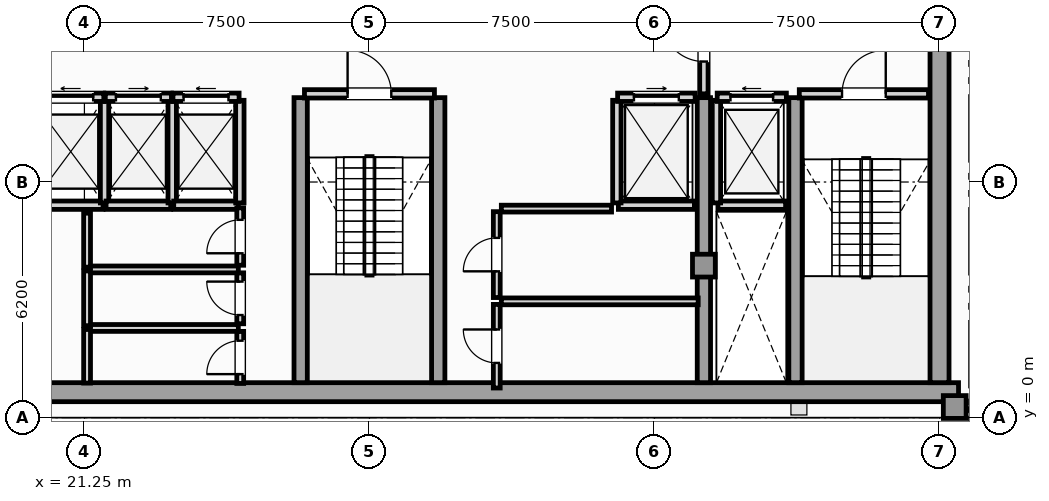
"""IFC4 building model, lengths in metres.
Left out: names, types, materials, properties, quantities, classifications, styles, units other than length and angle.
Written with IfcOpenShell. Run it as: python <this file> out.ifc"""

import sys

from ifc_helpers import new_model, si_unit, direction, frame, frame_2d, origin, origin_2d, place, context, subcontext, project, spatial, rectangle, extrude, element, fill, save


model = new_model("IFC4")
c1 = context("Model", 3, precision=1e-05, world=origin(), true_north=direction((0.0, 1.0)))
c2 = subcontext(c1, "Body", "Model", "MODEL_VIEW")
j1 = project(units=[si_unit("LENGTHUNIT", "METRE"), si_unit("PLANEANGLEUNIT", "RADIAN")], contexts=[c1])
p1 = place(None, origin())
s1 = spatial("IfcSite", under=j1, at=p1, CompositionType="ELEMENT")
p2 = place(p1, origin())
s2 = spatial("IfcBuilding", under=s1, at=p2, CompositionType="ELEMENT")
p3 = place(p2, frame((0.0, 0.0, 353.45)))
s3 = spatial("IfcBuildingStorey", under=s2, at=p3, CompositionType="ELEMENT", Elevation=353.45)
p4 = place(p3, frame((13.25, 0.67, 0.0), z_axis=(0.0, 0.0, 1.0), x_axis=(1.0, 0.0, 0.0)))
e1 = element("IfcWall", 1, at=p4, inside=s3, PredefinedType="SHEAR", context=c2, shape_type="SweptSolid", body=[
    extrude(rectangle(XDim=31.0, YDim=0.5, at=frame_2d((15.5, 0.0))), origin(), (0.0, 0.0, 1.0), 4.14),
])
p5 = place(p3, frame((43.75, 0.92, 0.0), z_axis=(0.0, 0.0, 1.0), x_axis=(0.0, 1.0, 0.0)))
e2 = element("IfcWall", 2, at=p5, inside=s3, PredefinedType="SHEAR", context=c2, shape_type="SweptSolid", body=[
    extrude(rectangle(XDim=10.53, YDim=0.5, at=frame_2d((5.265, 0.0))), origin(), (0.0, 0.0, 1.0), 4.14),
])
for number, where, z_axis, x_axis in (
    (3, (26.94, 0.92, 0.0), (0.0, 0.0, 1.0), (0.0, 1.0, 0.0)),
    (4, (30.56, 0.92, 0.0), (0.0, 0.0, 1.0), (0.0, 1.0, 0.0)),
    (5, (37.55, 0.92, 0.0), (0.0, 0.0, 1.0), (0.0, 1.0, 0.0)),
    (6, (39.96, 0.92, 0.0), (0.0, 0.0, 1.0), (0.0, 1.0, 0.0)),
):
    element("IfcWall", number, at=place(p3, frame(where, z_axis=z_axis, x_axis=x_axis)), inside=s3, PredefinedType="SHEAR", context=c2, shape_type="SweptSolid", body=[
        extrude(rectangle(XDim=7.5, YDim=0.35, at=frame_2d((3.75, 0.0))), origin(), (0.0, 0.0, 1.0), 4.14),
    ])
for number, where, z_axis, x_axis in (
    (7, (44.15, 0.28, 0.0), (0.0, 0.0, 1.0), (1.0, 0.0, 0.0)),
    (8, (37.55, 4.0, 0.0), (0.0, 0.0, 1.0), (1.0, 0.0, 0.0)),
):
    element("IfcColumn", number, at=place(p3, frame(where, z_axis=z_axis, x_axis=x_axis)), inside=s3, PredefinedType="COLUMN", context=c2, shape_type="SweptSolid", body=[
        extrude(rectangle(XDim=0.6, YDim=0.6, at=origin_2d()), origin(), (0.0, 0.0, 1.0), 4.4),
    ])
p6 = place(p3, frame((44.604, 0.12, 0.0), z_axis=(0.0, 0.0, 1.0), x_axis=(0.707106781187, 0.707106781187, 0.0)))
e9 = element("IfcWall", 9, at=p6, inside=s3, PredefinedType="SOLIDWALL", context=c2, shape_type="SweptSolid", body=[
    extrude(rectangle(XDim=4.446, YDim=0.26, at=frame_2d((2.223, 0.0))), origin(), (0.0, 0.0, 1.0), 4.14),
])
p7 = place(p6, frame((0.78, 0.0, 0.95)))
e10 = element("IfcOpeningElement", 10, at=p7, cuts=e9, PredefinedType="OPENING", context=c2, shape_type="SweptSolid", body=[
    extrude(rectangle(XDim=0.9, YDim=1.5, at=frame_2d((0.45, 0.75))), frame((0.0, 0.14, 0.0), z_axis=(0.0, -1.0, 0.0), x_axis=(1.0, 0.0, 0.0)), (0.0, 0.0, 1.0), 0.28),
])
p8 = place(p3, frame((37.92, 5.59, 0.0), z_axis=(0.0, 0.0, 1.0), x_axis=(1.0, 0.0, 0.0)))
e11 = element("IfcWall", 11, at=p8, inside=s3, PredefinedType="SOLIDWALL", context=c2, shape_type="SweptSolid", body=[
    extrude(rectangle(XDim=1.78, YDim=0.22, at=frame_2d((0.89, 0.0))), origin(), (0.0, 0.0, 1.0), 4.14),
])
p9 = place(p3, frame((37.88, 5.65, 0.0), z_axis=(0.0, 0.0, 1.0), x_axis=(0.0, 1.0, 0.0)))
e12 = element("IfcWall", 12, at=p9, inside=s3, PredefinedType="SOLIDWALL", context=c2, shape_type="SweptSolid", body=[
    extrude(rectangle(XDim=2.7, YDim=0.22, at=frame_2d((1.35, 0.0))), origin(), (0.0, 0.0, 1.0), 4.14),
])
p10 = place(p3, frame((37.9, 8.43, 0.0), z_axis=(0.0, 0.0, 1.0), x_axis=(1.0, 0.0, 0.0)))
e13 = element("IfcWall", 13, at=p10, inside=s3, PredefinedType="SOLIDWALL", context=c2, shape_type="SweptSolid", body=[
    extrude(rectangle(XDim=1.82, YDim=0.22, at=frame_2d((0.91, 0.0))), origin(), (0.0, 0.0, 1.0), 4.14),
])
p11 = place(p10, frame((0.35, 0.0, 0.0)))
e14 = element("IfcOpeningElement", 14, at=p11, cuts=e13, PredefinedType="OPENING", context=c2, shape_type="SweptSolid", body=[
    extrude(rectangle(XDim=1.12, YDim=2.25, at=frame_2d((0.56, 1.125))), frame((0.0, 0.12, 0.0), z_axis=(0.0, -1.0, 0.0), x_axis=(1.0, 0.0, 0.0)), (0.0, 0.0, 1.0), 0.24),
])
p12 = place(p3, frame((35.3, 5.59, 0.0), z_axis=(0.0, 0.0, 1.0), x_axis=(1.0, 0.0, 0.0)))
e15 = element("IfcWall", 15, at=p12, inside=s3, PredefinedType="SOLIDWALL", context=c2, shape_type="SweptSolid", body=[
    extrude(rectangle(XDim=2.0, YDim=0.22, at=frame_2d((1.0, 0.0))), origin(), (0.0, 0.0, 1.0), 4.14),
])
p13 = place(p3, frame((35.26, 5.65, 0.0), z_axis=(0.0, 0.0, 1.0), x_axis=(0.0, 1.0, 0.0)))
e16 = element("IfcWall", 16, at=p13, inside=s3, PredefinedType="SOLIDWALL", context=c2, shape_type="SweptSolid", body=[
    extrude(rectangle(XDim=2.7, YDim=0.22, at=frame_2d((1.35, 0.0))), origin(), (0.0, 0.0, 1.0), 4.14),
])
p14 = place(p3, frame((35.28, 8.43, 0.0), z_axis=(0.0, 0.0, 1.0), x_axis=(1.0, 0.0, 0.0)))
e17 = element("IfcWall", 17, at=p14, inside=s3, PredefinedType="SOLIDWALL", context=c2, shape_type="SweptSolid", body=[
    extrude(rectangle(XDim=2.04, YDim=0.22, at=frame_2d((1.02, 0.0))), origin(), (0.0, 0.0, 1.0), 4.14),
])
p15 = place(p14, frame((0.43, 0.0, 0.0)))
e18 = element("IfcOpeningElement", 18, at=p15, cuts=e17, PredefinedType="OPENING", context=c2, shape_type="SweptSolid", body=[
    extrude(rectangle(XDim=1.18, YDim=2.2, at=frame_2d((0.59, 1.1))), frame((0.0, 0.12, 0.0), z_axis=(0.0, -1.0, 0.0), x_axis=(1.0, 0.0, 0.0)), (0.0, 0.0, 1.0), 0.24),
])
p16 = place(p3, frame((20.04, 5.59, 0.0), z_axis=(0.0, 0.0, 1.0), x_axis=(1.0, 0.0, 0.0)))
e19 = element("IfcWall", 19, at=p16, inside=s3, PredefinedType="SOLIDWALL", context=c2, shape_type="SweptSolid", body=[
    extrude(rectangle(XDim=1.7, YDim=0.22, at=frame_2d((0.85, 0.0))), origin(), (0.0, 0.0, 1.0), 4.14),
])
p17 = place(p3, frame((21.78, 5.65, 0.0), z_axis=(0.0, 0.0, 1.0), x_axis=(0.0, 1.0, 0.0)))
e20 = element("IfcWall", 20, at=p17, inside=s3, PredefinedType="SOLIDWALL", context=c2, shape_type="SweptSolid", body=[
    extrude(rectangle(XDim=2.7, YDim=0.22, at=frame_2d((1.35, 0.0))), origin(), (0.0, 0.0, 1.0), 4.14),
])
p18 = place(p3, frame((20.02, 8.43, 0.0), z_axis=(0.0, 0.0, 1.0), x_axis=(1.0, 0.0, 0.0)))
e21 = element("IfcWall", 21, at=p18, inside=s3, PredefinedType="SOLIDWALL", context=c2, shape_type="SweptSolid", body=[
    extrude(rectangle(XDim=1.74, YDim=0.22, at=frame_2d((0.87, 0.0))), origin(), (0.0, 0.0, 1.0), 4.14),
])
p19 = place(p18, frame((0.28, 0.0, 0.0)))
e22 = element("IfcOpeningElement", 22, at=p19, cuts=e21, PredefinedType="OPENING", context=c2, shape_type="SweptSolid", body=[
    extrude(rectangle(XDim=1.18, YDim=2.2, at=frame_2d((0.59, 1.1))), frame((0.0, 0.12, 0.0), z_axis=(0.0, -1.0, 0.0), x_axis=(1.0, 0.0, 0.0)), (0.0, 0.0, 1.0), 0.24),
])
p20 = place(p3, frame((21.82, 5.59, 0.0), z_axis=(0.0, 0.0, 1.0), x_axis=(1.0, 0.0, 0.0)))
e23 = element("IfcWall", 23, at=p20, inside=s3, PredefinedType="SOLIDWALL", context=c2, shape_type="SweptSolid", body=[
    extrude(rectangle(XDim=1.7, YDim=0.22, at=frame_2d((0.85, 0.0))), origin(), (0.0, 0.0, 1.0), 4.14),
])
p21 = place(p3, frame((23.56, 5.65, 0.0), z_axis=(0.0, 0.0, 1.0), x_axis=(0.0, 1.0, 0.0)))
e24 = element("IfcWall", 24, at=p21, inside=s3, PredefinedType="SOLIDWALL", context=c2, shape_type="SweptSolid", body=[
    extrude(rectangle(XDim=2.7, YDim=0.22, at=frame_2d((1.35, 0.0))), origin(), (0.0, 0.0, 1.0), 4.14),
])
p22 = place(p3, frame((21.8, 8.43, 0.0), z_axis=(0.0, 0.0, 1.0), x_axis=(1.0, 0.0, 0.0)))
e25 = element("IfcWall", 25, at=p22, inside=s3, PredefinedType="SOLIDWALL", context=c2, shape_type="SweptSolid", body=[
    extrude(rectangle(XDim=1.74, YDim=0.22, at=frame_2d((0.87, 0.0))), origin(), (0.0, 0.0, 1.0), 4.14),
])
p23 = place(p22, frame((0.28, 0.0, 0.0)))
e26 = element("IfcOpeningElement", 26, at=p23, cuts=e25, PredefinedType="OPENING", context=c2, shape_type="SweptSolid", body=[
    extrude(rectangle(XDim=1.18, YDim=2.2, at=frame_2d((0.59, 1.1))), frame((0.0, 0.12, 0.0), z_axis=(0.0, -1.0, 0.0), x_axis=(1.0, 0.0, 0.0)), (0.0, 0.0, 1.0), 0.24),
])
p24 = place(p3, frame((23.6, 5.59, 0.0), z_axis=(0.0, 0.0, 1.0), x_axis=(1.0, 0.0, 0.0)))
e27 = element("IfcWall", 27, at=p24, inside=s3, PredefinedType="SOLIDWALL", context=c2, shape_type="SweptSolid", body=[
    extrude(rectangle(XDim=1.7, YDim=0.22, at=frame_2d((0.85, 0.0))), origin(), (0.0, 0.0, 1.0), 4.14),
])
p25 = place(p3, frame((25.34, 5.65, 0.0), z_axis=(0.0, 0.0, 1.0), x_axis=(0.0, 1.0, 0.0)))
e28 = element("IfcWall", 28, at=p25, inside=s3, PredefinedType="SOLIDWALL", context=c2, shape_type="SweptSolid", body=[
    extrude(rectangle(XDim=2.7, YDim=0.22, at=frame_2d((1.35, 0.0))), origin(), (0.0, 0.0, 1.0), 4.14),
])
p26 = place(p3, frame((23.58, 8.43, 0.0), z_axis=(0.0, 0.0, 1.0), x_axis=(1.0, 0.0, 0.0)))
e29 = element("IfcWall", 29, at=p26, inside=s3, PredefinedType="SOLIDWALL", context=c2, shape_type="SweptSolid", body=[
    extrude(rectangle(XDim=1.74, YDim=0.22, at=frame_2d((0.87, 0.0))), origin(), (0.0, 0.0, 1.0), 4.14),
])
p27 = place(p26, frame((0.28, 0.0, 0.0)))
e30 = element("IfcOpeningElement", 30, at=p27, cuts=e29, PredefinedType="OPENING", context=c2, shape_type="SweptSolid", body=[
    extrude(rectangle(XDim=1.18, YDim=2.2, at=frame_2d((0.59, 1.1))), frame((0.0, 0.12, 0.0), z_axis=(0.0, -1.0, 0.0), x_axis=(1.0, 0.0, 0.0)), (0.0, 0.0, 1.0), 0.24),
])
p28 = place(p3, frame((40.06, 8.52, 0.0), z_axis=(0.0, 0.0, 1.0), x_axis=(1.0, 0.0, 0.0)))
e31 = element("IfcWall", 31, at=p28, inside=s3, PredefinedType="SOLIDWALL", context=c2, shape_type="SweptSolid", body=[
    extrude(rectangle(XDim=3.4, YDim=0.22, at=frame_2d((1.7, 0.0))), origin(), (0.0, 0.0, 1.0), 4.14),
])
p29 = place(p28, frame((1.125, 0.0, 0.0)))
e32 = element("IfcOpeningElement", 32, at=p29, cuts=e31, PredefinedType="OPENING", context=c2, shape_type="SweptSolid", body=[
    extrude(rectangle(XDim=1.15, YDim=2.2, at=frame_2d((0.575, 1.1))), frame((0.0, 0.12, 0.0), z_axis=(0.0, -1.0, 0.0), x_axis=(1.0, 0.0, 0.0)), (0.0, 0.0, 1.0), 0.24),
])
p30 = place(p3, frame((27.04, 8.52, 0.0), z_axis=(0.0, 0.0, 1.0), x_axis=(1.0, 0.0, 0.0)))
e33 = element("IfcWall", 33, at=p30, inside=s3, PredefinedType="SOLIDWALL", context=c2, shape_type="SweptSolid", body=[
    extrude(rectangle(XDim=3.42, YDim=0.22, at=frame_2d((1.71, 0.0))), origin(), (0.0, 0.0, 1.0), 4.14),
])
p31 = place(p30, frame((1.135, 0.0, 0.0)))
e34 = element("IfcOpeningElement", 34, at=p31, cuts=e33, PredefinedType="OPENING", context=c2, shape_type="SweptSolid", body=[
    extrude(rectangle(XDim=1.15, YDim=2.2, at=frame_2d((0.575, 1.1))), frame((0.0, 0.12, 0.0), z_axis=(0.0, -1.0, 0.0), x_axis=(1.0, 0.0, 0.0)), (0.0, 0.0, 1.0), 0.24),
])
p32 = place(p3, frame((37.55, 8.52, 0.0), z_axis=(0.0, 0.0, 1.0), x_axis=(0.0, 1.0, 0.0)))
e35 = element("IfcWall", 35, at=p32, inside=s3, PredefinedType="SOLIDWALL", context=c2, shape_type="SweptSolid", body=[
    extrude(rectangle(XDim=2.8, YDim=0.22, at=frame_2d((1.4, 0.0))), origin(), (0.0, 0.0, 1.0), 3.595),
])
p33 = place(p32, frame((0.85, 0.0, 0.0)))
e36 = element("IfcOpeningElement", 36, at=p33, cuts=e35, PredefinedType="OPENING", context=c2, shape_type="SweptSolid", body=[
    extrude(rectangle(XDim=1.1, YDim=2.2, at=frame_2d((0.55, 1.1))), frame((0.0, 0.12, 0.0), z_axis=(0.0, -1.0, 0.0), x_axis=(1.0, 0.0, 0.0)), (0.0, 0.0, 1.0), 0.24),
])
p34 = place(p3, frame((25.35, 0.9, 0.0), z_axis=(0.0, 0.0, 1.0), x_axis=(0.0, 1.0, 0.0)))
e37 = element("IfcWall", 37, at=p34, inside=s3, PredefinedType="PARTITIONING", context=c2, shape_type="SweptSolid", body=[
    extrude(rectangle(XDim=1.37, YDim=0.18, at=frame_2d((0.685, 0.0))), origin(), (0.0, 0.0, 1.0), 4.14),
])
p35 = place(p34, frame((0.245, 0.0, 0.0)))
e38 = element("IfcOpeningElement", 38, at=p35, cuts=e37, PredefinedType="OPENING", context=c2, shape_type="SweptSolid", body=[
    extrude(rectangle(XDim=0.88, YDim=2.05, at=frame_2d((0.44, 1.025))), frame((0.0, 0.1, 0.0), z_axis=(0.0, -1.0, 0.0), x_axis=(1.0, 0.0, 0.0)), (0.0, 0.0, 1.0), 0.2),
])
p36 = place(p3, frame((21.36, 2.36, 0.0), z_axis=(0.0, 0.0, 1.0), x_axis=(1.0, 0.0, 0.0)))
e39 = element("IfcWall", 39, at=p36, inside=s3, PredefinedType="PARTITIONING", context=c2, shape_type="SweptSolid", body=[
    extrude(rectangle(XDim=3.94, YDim=0.18, at=frame_2d((1.97, 0.0))), origin(), (0.0, 0.0, 1.0), 4.14),
])
p37 = place(p3, frame((21.32, 0.91, 0.0), z_axis=(0.0, 0.0, 1.0), x_axis=(0.0, 1.0, 0.0)))
e40 = element("IfcWall", 40, at=p37, inside=s3, PredefinedType="PARTITIONING", context=c2, shape_type="SweptSolid", body=[
    extrude(rectangle(XDim=1.41, YDim=0.18, at=frame_2d((0.705, 0.0))), origin(), (0.0, 0.0, 1.0), 4.14),
])
p38 = place(p3, frame((25.35, 2.47, 0.0), z_axis=(0.0, 0.0, 1.0), x_axis=(0.0, 1.0, 0.0)))
e41 = element("IfcWall", 41, at=p38, inside=s3, PredefinedType="PARTITIONING", context=c2, shape_type="SweptSolid", body=[
    extrude(rectangle(XDim=1.34, YDim=0.18, at=frame_2d((0.67, 0.0))), origin(), (0.0, 0.0, 1.0), 4.14),
])
p39 = place(p38, frame((0.23, 0.0, 0.0)))
e42 = element("IfcOpeningElement", 42, at=p39, cuts=e41, PredefinedType="OPENING", context=c2, shape_type="SweptSolid", body=[
    extrude(rectangle(XDim=0.88, YDim=2.05, at=frame_2d((0.44, 1.025))), frame((0.0, 0.1, 0.0), z_axis=(0.0, -1.0, 0.0), x_axis=(1.0, 0.0, 0.0)), (0.0, 0.0, 1.0), 0.2),
])
p40 = place(p3, frame((21.36, 3.9, 0.0), z_axis=(0.0, 0.0, 1.0), x_axis=(1.0, 0.0, 0.0)))
e43 = element("IfcWall", 43, at=p40, inside=s3, PredefinedType="PARTITIONING", context=c2, shape_type="SweptSolid", body=[
    extrude(rectangle(XDim=3.94, YDim=0.18, at=frame_2d((1.97, 0.0))), origin(), (0.0, 0.0, 1.0), 4.14),
])
p41 = place(p3, frame((21.32, 2.42, 0.0), z_axis=(0.0, 0.0, 1.0), x_axis=(0.0, 1.0, 0.0)))
e44 = element("IfcWall", 44, at=p41, inside=s3, PredefinedType="PARTITIONING", context=c2, shape_type="SweptSolid", body=[
    extrude(rectangle(XDim=1.44, YDim=0.18, at=frame_2d((0.72, 0.0))), origin(), (0.0, 0.0, 1.0), 4.14),
])
p42 = place(p3, frame((25.35, 4.01, 0.0), z_axis=(0.0, 0.0, 1.0), x_axis=(0.0, 1.0, 0.0)))
e45 = element("IfcWall", 45, at=p42, inside=s3, PredefinedType="PARTITIONING", context=c2, shape_type="SweptSolid", body=[
    extrude(rectangle(XDim=1.51, YDim=0.18, at=frame_2d((0.755, 0.0))), origin(), (0.0, 0.0, 1.0), 4.14),
])
p43 = place(p42, frame((0.315, 0.0, 0.0)))
e46 = element("IfcOpeningElement", 46, at=p43, cuts=e45, PredefinedType="OPENING", context=c2, shape_type="SweptSolid", body=[
    extrude(rectangle(XDim=0.88, YDim=2.05, at=frame_2d((0.44, 1.025))), frame((0.0, 0.1, 0.0), z_axis=(0.0, -1.0, 0.0), x_axis=(1.0, 0.0, 0.0)), (0.0, 0.0, 1.0), 0.2),
])
p44 = place(p3, frame((21.32, 3.96, 0.0), z_axis=(0.0, 0.0, 1.0), x_axis=(0.0, 1.0, 0.0)))
e47 = element("IfcWall", 47, at=p44, inside=s3, PredefinedType="PARTITIONING", context=c2, shape_type="SweptSolid", body=[
    extrude(rectangle(XDim=1.42, YDim=0.18, at=frame_2d((0.71, 0.0))), origin(), (0.0, 0.0, 1.0), 4.14),
])
p45 = place(p3, frame((32.1, 0.78, 0.0), z_axis=(0.0, 0.0, 1.0), x_axis=(0.0, 1.0, 0.0)))
e48 = element("IfcWall", 48, at=p45, inside=s3, PredefinedType="PARTITIONING", context=c2, shape_type="SweptSolid", body=[
    extrude(rectangle(XDim=2.2, YDim=0.18, at=frame_2d((1.1, 0.0))), origin(), (0.0, 0.0, 1.0), 4.14),
])
p46 = place(p45, frame((0.66, 0.0, 0.0)))
e49 = element("IfcOpeningElement", 49, at=p46, cuts=e48, PredefinedType="OPENING", context=c2, shape_type="SweptSolid", body=[
    extrude(rectangle(XDim=0.88, YDim=2.05, at=frame_2d((0.44, 1.025))), frame((0.0, 0.1, 0.0), z_axis=(0.0, -1.0, 0.0), x_axis=(1.0, 0.0, 0.0)), (0.0, 0.0, 1.0), 0.2),
])
p47 = place(p3, frame((32.22, 3.06, 0.0), z_axis=(0.0, 0.0, 1.0), x_axis=(1.0, 0.0, 0.0)))
e50 = element("IfcWall", 50, at=p47, inside=s3, PredefinedType="PARTITIONING", context=c2, shape_type="SweptSolid", body=[
    extrude(rectangle(XDim=5.18, YDim=0.18, at=frame_2d((2.59, 0.0))), origin(), (0.0, 0.0, 1.0), 4.14),
])
p48 = place(p3, frame((32.1, 3.16, 0.0), z_axis=(0.0, 0.0, 1.0), x_axis=(0.0, 1.0, 0.0)))
e51 = element("IfcWall", 51, at=p48, inside=s3, PredefinedType="PARTITIONING", context=c2, shape_type="SweptSolid", body=[
    extrude(rectangle(XDim=2.26, YDim=0.18, at=frame_2d((1.13, 0.0))), origin(), (0.0, 0.0, 1.0), 4.14),
])
p49 = place(p48, frame((0.69, 0.0, 0.0)))
e52 = element("IfcOpeningElement", 52, at=p49, cuts=e51, PredefinedType="OPENING", context=c2, shape_type="SweptSolid", body=[
    extrude(rectangle(XDim=0.88, YDim=2.05, at=frame_2d((0.44, 1.025))), frame((0.0, 0.1, 0.0), z_axis=(0.0, -1.0, 0.0), x_axis=(1.0, 0.0, 0.0)), (0.0, 0.0, 1.0), 0.2),
])
p50 = place(p3, frame((32.22, 5.5, 0.0), z_axis=(0.0, 0.0, 1.0), x_axis=(1.0, 0.0, 0.0)))
e53 = element("IfcWall", 53, at=p50, inside=s3, PredefinedType="PARTITIONING", context=c2, shape_type="SweptSolid", body=[
    extrude(rectangle(XDim=2.9, YDim=0.18, at=frame_2d((1.45, 0.0))), origin(), (0.0, 0.0, 1.0), 4.14),
])
p51 = place(p11, origin())
e54 = element("IfcDoor", 54, at=p51, inside=s3, OperationType="SLIDING_TO_LEFT", PredefinedType="DOOR", context=c2, shape_type="SweptSolid", body=[
    extrude(rectangle(XDim=1.12, YDim=2.25, at=frame_2d((0.56, 1.125))), frame((0.0, 0.025, 0.0), z_axis=(0.0, -1.0, 0.0), x_axis=(1.0, 0.0, 0.0)), (0.0, 0.0, 1.0), 0.05),
])
fill(e14, e54)
p52 = place(p15, origin())
e55 = element("IfcDoor", 55, at=p52, inside=s3, OperationType="SLIDING_TO_RIGHT", PredefinedType="DOOR", context=c2, shape_type="SweptSolid", body=[
    extrude(rectangle(XDim=1.18, YDim=2.2, at=frame_2d((0.59, 1.1))), frame((0.0, 0.025, 0.0), z_axis=(0.0, -1.0, 0.0), x_axis=(1.0, 0.0, 0.0)), (0.0, 0.0, 1.0), 0.05),
])
fill(e18, e55)
p53 = place(p19, origin())
e56 = element("IfcDoor", 56, at=p53, inside=s3, OperationType="SLIDING_TO_LEFT", PredefinedType="DOOR", context=c2, shape_type="SweptSolid", body=[
    extrude(rectangle(XDim=1.18, YDim=2.2, at=frame_2d((0.59, 1.1))), frame((0.0, 0.025, 0.0), z_axis=(0.0, -1.0, 0.0), x_axis=(1.0, 0.0, 0.0)), (0.0, 0.0, 1.0), 0.05),
])
fill(e22, e56)
p54 = place(p23, origin())
e57 = element("IfcDoor", 57, at=p54, inside=s3, OperationType="SLIDING_TO_RIGHT", PredefinedType="DOOR", context=c2, shape_type="SweptSolid", body=[
    extrude(rectangle(XDim=1.18, YDim=2.2, at=frame_2d((0.59, 1.1))), frame((0.0, 0.025, 0.0), z_axis=(0.0, -1.0, 0.0), x_axis=(1.0, 0.0, 0.0)), (0.0, 0.0, 1.0), 0.05),
])
fill(e26, e57)
p55 = place(p27, origin())
e58 = element("IfcDoor", 58, at=p55, inside=s3, OperationType="SLIDING_TO_LEFT", PredefinedType="DOOR", context=c2, shape_type="SweptSolid", body=[
    extrude(rectangle(XDim=1.18, YDim=2.2, at=frame_2d((0.59, 1.1))), frame((0.0, 0.025, 0.0), z_axis=(0.0, -1.0, 0.0), x_axis=(1.0, 0.0, 0.0)), (0.0, 0.0, 1.0), 0.05),
])
fill(e30, e58)
p56 = place(p29, origin())
e59 = element("IfcDoor", 59, at=p56, inside=s3, OperationType="SINGLE_SWING_RIGHT", PredefinedType="DOOR", context=c2, shape_type="SweptSolid", body=[
    extrude(rectangle(XDim=1.15, YDim=2.2, at=frame_2d((0.575, 1.1))), frame((0.0, 0.025, 0.0), z_axis=(0.0, -1.0, 0.0), x_axis=(1.0, 0.0, 0.0)), (0.0, 0.0, 1.0), 0.05),
])
fill(e32, e59)
p57 = place(p31, origin())
e60 = element("IfcDoor", 60, at=p57, inside=s3, OperationType="SINGLE_SWING_LEFT", PredefinedType="DOOR", context=c2, shape_type="SweptSolid", body=[
    extrude(rectangle(XDim=1.15, YDim=2.2, at=frame_2d((0.575, 1.1))), frame((0.0, 0.025, 0.0), z_axis=(0.0, -1.0, 0.0), x_axis=(1.0, 0.0, 0.0)), (0.0, 0.0, 1.0), 0.05),
])
fill(e34, e60)
p58 = place(p33, origin())
e61 = element("IfcDoor", 61, at=p58, inside=s3, OperationType="SINGLE_SWING_RIGHT", PredefinedType="DOOR", context=c2, shape_type="SweptSolid", body=[
    extrude(rectangle(XDim=1.1, YDim=2.2, at=frame_2d((0.55, 1.1))), frame((0.0, 0.025, 0.0), z_axis=(0.0, -1.0, 0.0), x_axis=(1.0, 0.0, 0.0)), (0.0, 0.0, 1.0), 0.05),
])
fill(e36, e61)
p59 = place(p35, origin())
e62 = element("IfcDoor", 62, at=p59, inside=s3, OperationType="SINGLE_SWING_LEFT", PredefinedType="DOOR", context=c2, shape_type="SweptSolid", body=[
    extrude(rectangle(XDim=0.88, YDim=2.05, at=frame_2d((0.44, 1.025))), frame((0.0, 0.025, 0.0), z_axis=(0.0, -1.0, 0.0), x_axis=(1.0, 0.0, 0.0)), (0.0, 0.0, 1.0), 0.05),
])
fill(e38, e62)
p60 = place(p39, origin())
e63 = element("IfcDoor", 63, at=p60, inside=s3, OperationType="SINGLE_SWING_RIGHT", PredefinedType="DOOR", context=c2, shape_type="SweptSolid", body=[
    extrude(rectangle(XDim=0.88, YDim=2.05, at=frame_2d((0.44, 1.025))), frame((0.0, 0.025, 0.0), z_axis=(0.0, -1.0, 0.0), x_axis=(1.0, 0.0, 0.0)), (0.0, 0.0, 1.0), 0.05),
])
fill(e42, e63)
p61 = place(p43, origin())
e64 = element("IfcDoor", 64, at=p61, inside=s3, OperationType="SINGLE_SWING_LEFT", PredefinedType="DOOR", context=c2, shape_type="SweptSolid", body=[
    extrude(rectangle(XDim=0.88, YDim=2.05, at=frame_2d((0.44, 1.025))), frame((0.0, 0.025, 0.0), z_axis=(0.0, -1.0, 0.0), x_axis=(1.0, 0.0, 0.0)), (0.0, 0.0, 1.0), 0.05),
])
fill(e46, e64)
p62 = place(p46, origin())
e65 = element("IfcDoor", 65, at=p62, inside=s3, OperationType="SINGLE_SWING_RIGHT", PredefinedType="DOOR", context=c2, shape_type="SweptSolid", body=[
    extrude(rectangle(XDim=0.88, YDim=2.05, at=frame_2d((0.44, 1.025))), frame((0.0, 0.025, 0.0), z_axis=(0.0, -1.0, 0.0), x_axis=(1.0, 0.0, 0.0)), (0.0, 0.0, 1.0), 0.05),
])
fill(e49, e65)
p63 = place(p49, origin())
e66 = element("IfcDoor", 66, at=p63, inside=s3, OperationType="SINGLE_SWING_LEFT", PredefinedType="DOOR", context=c2, shape_type="SweptSolid", body=[
    extrude(rectangle(XDim=0.88, YDim=2.05, at=frame_2d((0.44, 1.025))), frame((0.0, 0.025, 0.0), z_axis=(0.0, -1.0, 0.0), x_axis=(1.0, 0.0, 0.0)), (0.0, 0.0, 1.0), 0.05),
])
fill(e52, e66)
save(model, sys.argv[1])
